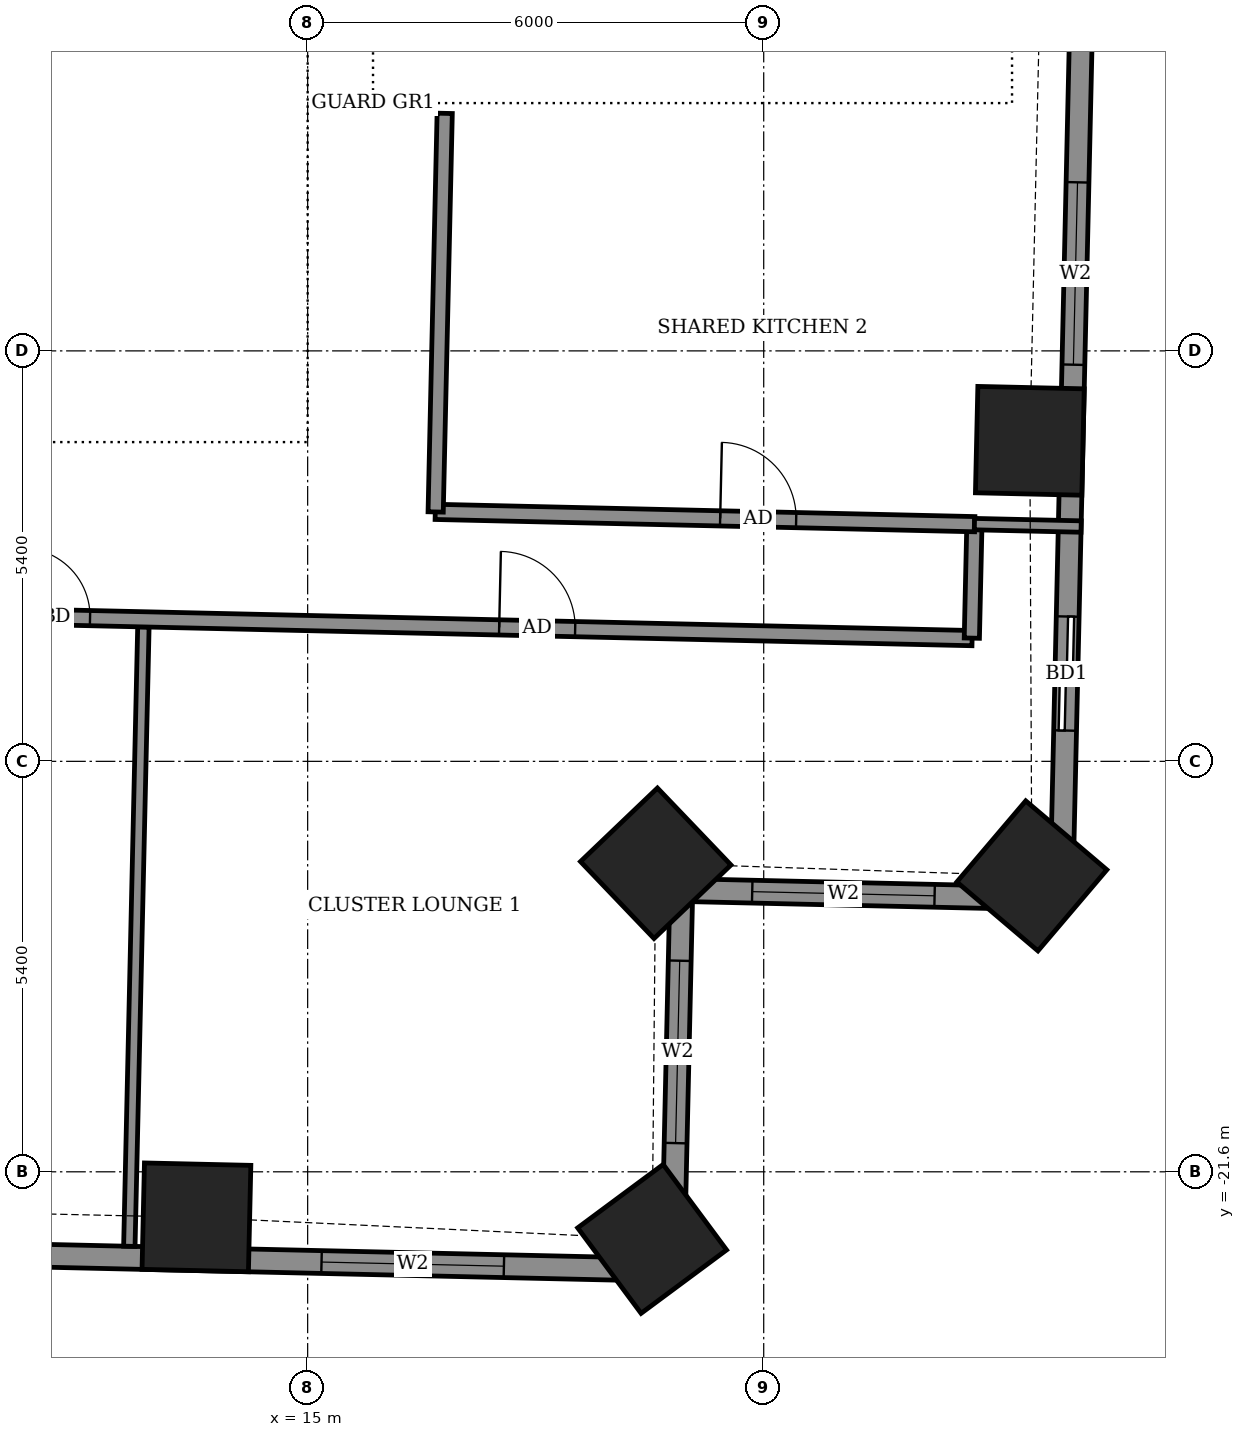
"""IFC4 building model, lengths in metres.
Left out: names, types, materials, properties, quantities, classifications, styles, units other than length and angle.
Written with IfcOpenShell. Run it as: python <this file> out.ifc"""

import sys

from ifc_helpers import new_model, si_unit, direction, frame, frame_2d, origin, origin_2d, place, context, subcontext, project, spatial, rectangle, extrude, element, fill, save


model = new_model("IFC4")
c1 = context("Model", 3, precision=1e-05, world=origin(), true_north=direction((0.0, 1.0)))
c2 = subcontext(c1, "Body", "Model", "MODEL_VIEW")
j1 = project(units=[si_unit("LENGTHUNIT", "METRE"), si_unit("PLANEANGLEUNIT", "RADIAN")], contexts=[c1])
p1 = place(None, origin())
s1 = spatial("IfcSite", under=j1, at=p1, CompositionType="ELEMENT")
p2 = place(p1, origin())
s2 = spatial("IfcBuilding", under=s1, at=p2, CompositionType="ELEMENT")
p3 = place(p2, frame((0.0, 0.0, 101.9)))
s3 = spatial("IfcBuildingStorey", under=s2, at=p3, CompositionType="ELEMENT", Elevation=101.9)
for number, where, z_axis, x_axis in (
    (1, (13.537, -22.199, -0.55), (0.0, 0.0, 1.0), (1.0, -0.023, 0.0)),
    (2, (19.532, -22.483, -0.55), (0.0, 0.0, 1.0), (0.803, 0.596, 0.0)),
    (3, (19.579, -17.541, -0.55), (0.0, 0.0, 1.0), (0.723, 0.691, 0.0)),
    (4, (24.528, -17.707, -0.55), (0.0, 0.0, 1.0), (0.647, 0.762, 0.0)),
    (5, (24.501, -11.983, -0.55), (0.0, 0.0, 1.0), (0.023, 1.0, 0.0)),
):
    element("IfcColumn", number, at=place(p3, frame(where, z_axis=z_axis, x_axis=x_axis)), inside=s3, PredefinedType="COLUMN", context=c2, shape_type="SweptSolid", body=[
        extrude(rectangle(XDim=1.4, YDim=1.4, at=origin_2d()), origin(), (0.0, 0.0, 1.0), 3.6),
    ])
p4 = place(p3, frame((24.915, -18.007, 0.0), z_axis=(0.0, 0.0, 1.0), x_axis=(0.02263706344, 0.999743748847, 0.0)))
e6 = element("IfcWall", 6, at=p4, inside=s3, PredefinedType="SOLIDWALL", context=c2, shape_type="SweptSolid", body=[
    extrude(rectangle(XDim=12.23, YDim=0.3, at=frame_2d((6.115, 0.0))), origin(), (0.0, 0.0, 1.0), 3.05),
])
p5 = place(p4, frame((2.213, 0.0, 0.0)))
e7 = element("IfcOpeningElement", 7, at=p5, cuts=e6, PredefinedType="OPENING", context=c2, shape_type="SweptSolid", body=[
    extrude(rectangle(XDim=1.5, YDim=2.4, at=frame_2d((0.75, 1.2))), frame((0.0, 0.16, 0.0), z_axis=(0.0, -1.0, 0.0), x_axis=(1.0, 0.0, 0.0)), (0.0, 0.0, 1.0), 0.32),
])
p6 = place(p4, frame((7.027, 0.0, 0.9)))
e8 = element("IfcOpeningElement", 8, at=p6, cuts=e6, PredefinedType="OPENING", context=c2, shape_type="SweptSolid", body=[
    extrude(rectangle(XDim=2.4, YDim=1.5, at=frame_2d((1.2, 0.75))), frame((0.0, 0.16, 0.0), z_axis=(0.0, -1.0, 0.0), x_axis=(1.0, 0.0, 0.0)), (0.0, 0.0, 1.0), 0.32),
])
p7 = place(p3, frame((-24.894, -21.878, 0.0), z_axis=(0.0, 0.0, 1.0), x_axis=(0.999742689045, -0.022683820265, 0.0)))
e9 = element("IfcWall", 9, at=p7, inside=s3, PredefinedType="SOLIDWALL", context=c2, shape_type="SweptSolid", body=[
    extrude(rectangle(XDim=44.708, YDim=0.3, at=frame_2d((22.354, 0.0))), origin(), (0.0, 0.0, 1.0), 3.05),
])
p8 = place(p7, frame((2.051, 0.0, 0.0)))
e10 = element("IfcOpeningElement", 10, at=p8, cuts=e9, PredefinedType="OPENING", context=c2, shape_type="SweptSolid", body=[
    extrude(rectangle(XDim=1.5, YDim=2.4, at=frame_2d((0.75, 1.2))), frame((0.0, 0.16, 0.0), z_axis=(0.0, -1.0, 0.0), x_axis=(1.0, 0.0, 0.0)), (0.0, 0.0, 1.0), 0.32),
])
p9 = place(p7, frame((7.265, 0.0, 0.0)))
e11 = element("IfcOpeningElement", 11, at=p9, cuts=e9, PredefinedType="OPENING", context=c2, shape_type="SweptSolid", body=[
    extrude(rectangle(XDim=1.5, YDim=2.4, at=frame_2d((0.75, 1.2))), frame((0.0, 0.16, 0.0), z_axis=(0.0, -1.0, 0.0), x_axis=(1.0, 0.0, 0.0)), (0.0, 0.0, 1.0), 0.32),
])
p10 = place(p7, frame((10.03, 0.0, 0.0)))
e12 = element("IfcOpeningElement", 12, at=p10, cuts=e9, PredefinedType="OPENING", context=c2, shape_type="SweptSolid", body=[
    extrude(rectangle(XDim=1.5, YDim=2.4, at=frame_2d((0.75, 1.2))), frame((0.0, 0.16, 0.0), z_axis=(0.0, -1.0, 0.0), x_axis=(1.0, 0.0, 0.0)), (0.0, 0.0, 1.0), 0.32),
])
p11 = place(p7, frame((15.5, 0.0, 0.0)))
e13 = element("IfcOpeningElement", 13, at=p11, cuts=e9, PredefinedType="OPENING", context=c2, shape_type="SweptSolid", body=[
    extrude(rectangle(XDim=1.5, YDim=2.4, at=frame_2d((0.75, 1.2))), frame((0.0, 0.16, 0.0), z_axis=(0.0, -1.0, 0.0), x_axis=(1.0, 0.0, 0.0)), (0.0, 0.0, 1.0), 0.32),
])
p12 = place(p7, frame((20.745, 0.0, 0.0)))
e14 = element("IfcOpeningElement", 14, at=p12, cuts=e9, PredefinedType="OPENING", context=c2, shape_type="SweptSolid", body=[
    extrude(rectangle(XDim=1.5, YDim=2.4, at=frame_2d((0.75, 1.2))), frame((0.0, 0.16, 0.0), z_axis=(0.0, -1.0, 0.0), x_axis=(1.0, 0.0, 0.0)), (0.0, 0.0, 1.0), 0.32),
])
p13 = place(p7, frame((26.41, 0.0, 0.0)))
e15 = element("IfcOpeningElement", 15, at=p13, cuts=e9, PredefinedType="OPENING", context=c2, shape_type="SweptSolid", body=[
    extrude(rectangle(XDim=1.2, YDim=2.4, at=frame_2d((0.6, 1.2))), frame((0.0, 0.16, 0.0), z_axis=(0.0, -1.0, 0.0), x_axis=(1.0, 0.0, 0.0)), (0.0, 0.0, 1.0), 0.32),
])
p14 = place(p7, frame((29.024, 0.0, 0.0)))
e16 = element("IfcOpeningElement", 16, at=p14, cuts=e9, PredefinedType="OPENING", context=c2, shape_type="SweptSolid", body=[
    extrude(rectangle(XDim=1.5, YDim=2.4, at=frame_2d((0.75, 1.2))), frame((0.0, 0.16, 0.0), z_axis=(0.0, -1.0, 0.0), x_axis=(1.0, 0.0, 0.0)), (0.0, 0.0, 1.0), 0.32),
])
p15 = place(p7, frame((34.45, 0.0, 0.0)))
e17 = element("IfcOpeningElement", 17, at=p15, cuts=e9, PredefinedType="OPENING", context=c2, shape_type="SweptSolid", body=[
    extrude(rectangle(XDim=1.5, YDim=2.4, at=frame_2d((0.75, 1.2))), frame((0.0, 0.16, 0.0), z_axis=(0.0, -1.0, 0.0), x_axis=(1.0, 0.0, 0.0)), (0.0, 0.0, 1.0), 0.32),
])
p16 = place(p7, frame((40.087, 0.0, 0.9)))
e18 = element("IfcOpeningElement", 18, at=p16, cuts=e9, PredefinedType="OPENING", context=c2, shape_type="SweptSolid", body=[
    extrude(rectangle(XDim=2.4, YDim=1.5, at=frame_2d((1.2, 0.75))), frame((0.0, 0.16, 0.0), z_axis=(0.0, -1.0, 0.0), x_axis=(1.0, 0.0, 0.0)), (0.0, 0.0, 1.0), 0.32),
])
p17 = place(p3, frame((19.803, -22.892, 0.0), z_axis=(0.0, 0.0, 1.0), x_axis=(0.022606059803, 0.999744450377, 0.0)))
e19 = element("IfcWall", 19, at=p17, inside=s3, PredefinedType="SOLIDWALL", context=c2, shape_type="SweptSolid", body=[
    extrude(rectangle(XDim=5.0, YDim=0.3, at=frame_2d((2.5, 0.0))), origin(), (0.0, 0.0, 1.0), 2.55),
])
p18 = place(p17, frame((1.67, 0.0, 0.9)))
e20 = element("IfcOpeningElement", 20, at=p18, cuts=e19, PredefinedType="OPENING", context=c2, shape_type="SweptSolid", body=[
    extrude(rectangle(XDim=2.4, YDim=1.5, at=frame_2d((1.2, 0.75))), frame((0.0, 0.16, 0.0), z_axis=(0.0, -1.0, 0.0), x_axis=(1.0, 0.0, 0.0)), (0.0, 0.0, 1.0), 0.32),
])
p19 = place(p3, frame((19.916, -17.893, 0.0), z_axis=(0.0, 0.0, 1.0), x_axis=(0.999740017489, -0.022801259434, 0.0)))
e21 = element("IfcWall", 21, at=p19, inside=s3, PredefinedType="SOLIDWALL", context=c2, shape_type="SweptSolid", body=[
    extrude(rectangle(XDim=5.0, YDim=0.3, at=frame_2d((2.5, 0.0))), origin(), (0.0, 0.0, 1.0), 2.55),
])
p20 = place(p19, frame((0.933, 0.0, 0.9)))
e22 = element("IfcOpeningElement", 22, at=p20, cuts=e21, PredefinedType="OPENING", context=c2, shape_type="SweptSolid", body=[
    extrude(rectangle(XDim=2.4, YDim=1.5, at=frame_2d((1.2, 0.75))), frame((0.0, 0.16, 0.0), z_axis=(0.0, -1.0, 0.0), x_axis=(1.0, 0.0, 0.0)), (0.0, 0.0, 1.0), 0.32),
])
p21 = place(p3, frame((12.654, -22.58, 0.0), z_axis=(0.0, 0.0, 1.0), x_axis=(0.022705755232, 0.999742191107, 0.0)))
e23 = element("IfcWall", 23, at=p21, inside=s3, PredefinedType="PARTITIONING", context=c2, shape_type="SweptSolid", body=[
    extrude(rectangle(XDim=8.15, YDim=0.15, at=frame_2d((4.075, 0.0))), origin(), (0.0, 0.0, 1.0), 2.55),
])
p22 = place(p3, frame((-26.953, -13.429, 0.0), z_axis=(0.0, 0.0, 1.0), x_axis=(0.999742734556, -0.02268181435, 0.0)))
e24 = element("IfcWall", 24, at=p22, inside=s3, PredefinedType="PARTITIONING", context=c2, shape_type="SweptSolid", body=[
    extrude(rectangle(XDim=50.708, YDim=0.2, at=frame_2d((25.354, 0.0))), origin(), (0.0, 0.0, 1.0), 3.05),
])
p23 = place(p22, frame((0.5, 0.0, 0.0)))
e25 = element("IfcOpeningElement", 25, at=p23, cuts=e24, PredefinedType="OPENING", context=c2, shape_type="SweptSolid", body=[
    extrude(rectangle(XDim=1.0, YDim=2.1, at=frame_2d((0.5, 1.05))), frame((0.0, 0.11, 0.0), z_axis=(0.0, -1.0, 0.0), x_axis=(1.0, 0.0, 0.0)), (0.0, 0.0, 1.0), 0.22),
])
p24 = place(p22, frame((5.05, 0.0, 0.0)))
e26 = element("IfcOpeningElement", 26, at=p24, cuts=e24, PredefinedType="OPENING", context=c2, shape_type="SweptSolid", body=[
    extrude(rectangle(XDim=0.9, YDim=2.1, at=frame_2d((0.45, 1.05))), frame((0.0, 0.11, 0.0), z_axis=(0.0, -1.0, 0.0), x_axis=(1.0, 0.0, 0.0)), (0.0, 0.0, 1.0), 0.22),
])
p25 = place(p22, frame((9.975, 0.0, 0.0)))
e27 = element("IfcOpeningElement", 27, at=p25, cuts=e24, PredefinedType="OPENING", context=c2, shape_type="SweptSolid", body=[
    extrude(rectangle(XDim=0.9, YDim=2.1, at=frame_2d((0.45, 1.05))), frame((0.0, 0.11, 0.0), z_axis=(0.0, -1.0, 0.0), x_axis=(1.0, 0.0, 0.0)), (0.0, 0.0, 1.0), 0.22),
])
p26 = place(p22, frame((12.175, 0.0, 0.0)))
e28 = element("IfcOpeningElement", 28, at=p26, cuts=e24, PredefinedType="OPENING", context=c2, shape_type="SweptSolid", body=[
    extrude(rectangle(XDim=0.9, YDim=2.1, at=frame_2d((0.45, 1.05))), frame((0.0, 0.11, 0.0), z_axis=(0.0, -1.0, 0.0), x_axis=(1.0, 0.0, 0.0)), (0.0, 0.0, 1.0), 0.22),
])
p27 = place(p22, frame((19.25, 0.0, 0.0)))
e29 = element("IfcOpeningElement", 29, at=p27, cuts=e24, PredefinedType="OPENING", context=c2, shape_type="SweptSolid", body=[
    extrude(rectangle(XDim=0.9, YDim=2.1, at=frame_2d((0.45, 1.05))), frame((0.0, 0.11, 0.0), z_axis=(0.0, -1.0, 0.0), x_axis=(1.0, 0.0, 0.0)), (0.0, 0.0, 1.0), 0.22),
])
p28 = place(p22, frame((21.625, 0.0, 0.0)))
e30 = element("IfcOpeningElement", 30, at=p28, cuts=e24, PredefinedType="OPENING", context=c2, shape_type="SweptSolid", body=[
    extrude(rectangle(XDim=0.9, YDim=2.1, at=frame_2d((0.45, 1.05))), frame((0.0, 0.11, 0.0), z_axis=(0.0, -1.0, 0.0), x_axis=(1.0, 0.0, 0.0)), (0.0, 0.0, 1.0), 0.22),
])
p29 = place(p22, frame((28.7, 0.0, 0.0)))
e31 = element("IfcOpeningElement", 31, at=p29, cuts=e24, PredefinedType="OPENING", context=c2, shape_type="SweptSolid", body=[
    extrude(rectangle(XDim=0.9, YDim=2.1, at=frame_2d((0.45, 1.05))), frame((0.0, 0.11, 0.0), z_axis=(0.0, -1.0, 0.0), x_axis=(1.0, 0.0, 0.0)), (0.0, 0.0, 1.0), 0.22),
])
p30 = place(p22, frame((31.025, 0.0, 0.0)))
e32 = element("IfcOpeningElement", 32, at=p30, cuts=e24, PredefinedType="OPENING", context=c2, shape_type="SweptSolid", body=[
    extrude(rectangle(XDim=0.9, YDim=2.1, at=frame_2d((0.45, 1.05))), frame((0.0, 0.11, 0.0), z_axis=(0.0, -1.0, 0.0), x_axis=(1.0, 0.0, 0.0)), (0.0, 0.0, 1.0), 0.22),
])
p31 = place(p22, frame((38.2, 0.0, 0.0)))
e33 = element("IfcOpeningElement", 33, at=p31, cuts=e24, PredefinedType="OPENING", context=c2, shape_type="SweptSolid", body=[
    extrude(rectangle(XDim=0.9, YDim=2.1, at=frame_2d((0.45, 1.05))), frame((0.0, 0.11, 0.0), z_axis=(0.0, -1.0, 0.0), x_axis=(1.0, 0.0, 0.0)), (0.0, 0.0, 1.0), 0.22),
])
p32 = place(p22, frame((44.484, 0.0, 0.0)))
e34 = element("IfcOpeningElement", 34, at=p32, cuts=e24, PredefinedType="OPENING", context=c2, shape_type="SweptSolid", body=[
    extrude(rectangle(XDim=1.0, YDim=2.1, at=frame_2d((0.5, 1.05))), frame((0.0, 0.11, 0.0), z_axis=(0.0, -1.0, 0.0), x_axis=(1.0, 0.0, 0.0)), (0.0, 0.0, 1.0), 0.22),
])
p33 = place(p3, frame((23.738, -14.579, 0.0), z_axis=(0.0, 0.0, 1.0), x_axis=(0.022617910375, 0.999744182344, 0.0)))
e35 = element("IfcWall", 35, at=p33, inside=s3, PredefinedType="PARTITIONING", context=c2, shape_type="SweptSolid", body=[
    extrude(rectangle(XDim=1.5, YDim=0.2, at=frame_2d((0.75, 0.0))), origin(), (0.0, 0.0, 1.0), 3.05),
])
p34 = place(p3, frame((16.679, -12.918, 0.0), z_axis=(0.0, 0.0, 1.0), x_axis=(0.999739218926, -0.02283624622, 0.0)))
e36 = element("IfcWall", 36, at=p34, inside=s3, PredefinedType="PARTITIONING", context=c2, shape_type="SweptSolid", body=[
    extrude(rectangle(XDim=7.099, YDim=0.2, at=frame_2d((3.549, 0.0))), origin(), (0.0, 0.0, 1.0), 3.05),
])
p35 = place(p34, frame((3.749, 0.0, 0.0)))
e37 = element("IfcOpeningElement", 37, at=p35, cuts=e36, PredefinedType="OPENING", context=c2, shape_type="SweptSolid", body=[
    extrude(rectangle(XDim=1.0, YDim=2.1, at=frame_2d((0.5, 1.05))), frame((0.0, 0.11, 0.0), z_axis=(0.0, -1.0, 0.0), x_axis=(1.0, 0.0, 0.0)), (0.0, 0.0, 1.0), 0.22),
])
p36 = place(p3, frame((16.684, -12.919, 0.0), z_axis=(0.0, 0.0, 1.0), x_axis=(0.022667483124, 0.999743059595, 0.0)))
e38 = element("IfcWall", 38, at=p36, inside=s3, PredefinedType="PARTITIONING", context=c2, shape_type="SweptSolid", body=[
    extrude(rectangle(XDim=5.245, YDim=0.2, at=frame_2d((2.623, 0.0))), origin(), (0.0, 0.0, 1.0), 3.05),
])
p37 = place(p3, frame((23.772, -13.079, 0.0), z_axis=(0.0, 0.0, 1.0), x_axis=(0.999740667531, -0.022772739949, 0.0)))
e39 = element("IfcWall", 39, at=p37, inside=s3, PredefinedType="PARTITIONING", context=c2, shape_type="SweptSolid", body=[
    extrude(rectangle(XDim=1.404, YDim=0.15, at=frame_2d((0.702, 0.0))), origin(), (0.0, 0.0, 1.0), 2.55),
])
p38 = place(p3, frame((-14.8, -11.3, 0.0), z_axis=(0.0, 0.0, 1.0), x_axis=(1.0, 0.0, 0.0)))
e40 = element("IfcWall", 40, at=p38, inside=s3, PredefinedType="SHEAR", context=c2, shape_type="SweptSolid", body=[
    extrude(rectangle(XDim=29.6, YDim=1.0, at=frame_2d((14.8, 0.0))), origin(), (0.0, 0.0, 1.0), 3.6),
])
p39 = place(p3, frame((14.3, -10.8, 0.0), z_axis=(0.0, 0.0, 1.0), x_axis=(0.0, 1.0, 0.0)))
e41 = element("IfcWall", 41, at=p39, inside=s3, PredefinedType="SHEAR", context=c2, shape_type="SweptSolid", body=[
    extrude(rectangle(XDim=21.6, YDim=1.0, at=frame_2d((10.8, 0.0))), origin(), (0.0, 0.0, 1.0), 3.6),
])
p40 = place(p39, frame((1.2, 0.0, 0.0)))
e42 = element("IfcOpeningElement", 42, at=p40, cuts=e41, PredefinedType="OPENING", context=c2, shape_type="SweptSolid", body=[
    extrude(rectangle(XDim=1.2, YDim=2.1, at=frame_2d((0.6, 1.05))), frame((0.0, 0.51, 0.0), z_axis=(0.0, -1.0, 0.0), x_axis=(1.0, 0.0, 0.0)), (0.0, 0.0, 1.0), 1.02),
])
p41 = place(p5, origin())
e43 = element("IfcDoor", 43, at=p41, inside=s3, OperationType="SLIDING_TO_LEFT", PredefinedType="DOOR", context=c2, shape_type="SweptSolid", body=[
    extrude(rectangle(XDim=1.5, YDim=2.4, at=frame_2d((0.75, 1.2))), frame((0.0, 0.025, 0.0), z_axis=(0.0, -1.0, 0.0), x_axis=(1.0, 0.0, 0.0)), (0.0, 0.0, 1.0), 0.05),
])
fill(e7, e43)
p42 = place(p6, origin())
e44 = element("IfcWindow", 44, at=p42, inside=s3, PartitioningType="DOUBLE_PANEL_VERTICAL", PredefinedType="WINDOW", context=c2, shape_type="SweptSolid", body=[
    extrude(rectangle(XDim=2.4, YDim=1.5, at=frame_2d((1.2, 0.75))), frame((0.0, 0.03, 0.0), z_axis=(0.0, -1.0, 0.0), x_axis=(1.0, 0.0, 0.0)), (0.0, 0.0, 1.0), 0.06),
])
fill(e8, e44)
p43 = place(p16, origin())
e45 = element("IfcWindow", 45, at=p43, inside=s3, PartitioningType="DOUBLE_PANEL_VERTICAL", PredefinedType="WINDOW", context=c2, shape_type="SweptSolid", body=[
    extrude(rectangle(XDim=2.4, YDim=1.5, at=frame_2d((1.2, 0.75))), frame((0.0, 0.03, 0.0), z_axis=(0.0, -1.0, 0.0), x_axis=(1.0, 0.0, 0.0)), (0.0, 0.0, 1.0), 0.06),
])
fill(e18, e45)
p44 = place(p18, origin())
e46 = element("IfcWindow", 46, at=p44, inside=s3, PartitioningType="DOUBLE_PANEL_VERTICAL", PredefinedType="WINDOW", context=c2, shape_type="SweptSolid", body=[
    extrude(rectangle(XDim=2.4, YDim=1.5, at=frame_2d((1.2, 0.75))), frame((0.0, 0.03, 0.0), z_axis=(0.0, -1.0, 0.0), x_axis=(1.0, 0.0, 0.0)), (0.0, 0.0, 1.0), 0.06),
])
fill(e20, e46)
p45 = place(p20, origin())
e47 = element("IfcWindow", 47, at=p45, inside=s3, PartitioningType="DOUBLE_PANEL_VERTICAL", PredefinedType="WINDOW", context=c2, shape_type="SweptSolid", body=[
    extrude(rectangle(XDim=2.4, YDim=1.5, at=frame_2d((1.2, 0.75))), frame((0.0, 0.03, 0.0), z_axis=(0.0, -1.0, 0.0), x_axis=(1.0, 0.0, 0.0)), (0.0, 0.0, 1.0), 0.06),
])
fill(e22, e47)
p46 = place(p31, origin())
e48 = element("IfcDoor", 48, at=p46, inside=s3, OperationType="SINGLE_SWING_LEFT", PredefinedType="DOOR", context=c2, shape_type="SweptSolid", body=[
    extrude(rectangle(XDim=0.9, YDim=2.1, at=frame_2d((0.45, 1.05))), frame((0.0, 0.025, 0.0), z_axis=(0.0, -1.0, 0.0), x_axis=(1.0, 0.0, 0.0)), (0.0, 0.0, 1.0), 0.05),
])
fill(e33, e48)
p47 = place(p32, origin())
e49 = element("IfcDoor", 49, at=p47, inside=s3, OperationType="SINGLE_SWING_RIGHT", PredefinedType="DOOR", context=c2, shape_type="SweptSolid", body=[
    extrude(rectangle(XDim=1.0, YDim=2.1, at=frame_2d((0.5, 1.05))), frame((0.0, 0.025, 0.0), z_axis=(0.0, -1.0, 0.0), x_axis=(1.0, 0.0, 0.0)), (0.0, 0.0, 1.0), 0.05),
])
fill(e34, e49)
p48 = place(p35, origin())
e50 = element("IfcDoor", 50, at=p48, inside=s3, OperationType="SINGLE_SWING_LEFT", PredefinedType="DOOR", context=c2, shape_type="SweptSolid", body=[
    extrude(rectangle(XDim=1.0, YDim=2.1, at=frame_2d((0.5, 1.05))), frame((0.0, 0.025, 0.0), z_axis=(0.0, -1.0, 0.0), x_axis=(1.0, 0.0, 0.0)), (0.0, 0.0, 1.0), 0.05),
])
fill(e37, e50)
p49 = place(p40, origin())
e51 = element("IfcDoor", 51, at=p49, inside=s3, OperationType="DOUBLE_DOOR_SINGLE_SWING", PredefinedType="DOOR", context=c2, shape_type="SweptSolid", body=[
    extrude(rectangle(XDim=1.2, YDim=2.1, at=frame_2d((0.6, 1.05))), frame((0.0, 0.025, 0.0), z_axis=(0.0, -1.0, 0.0), x_axis=(1.0, 0.0, 0.0)), (0.0, 0.0, 1.0), 0.05),
])
fill(e42, e51)
save(model, sys.argv[1])
